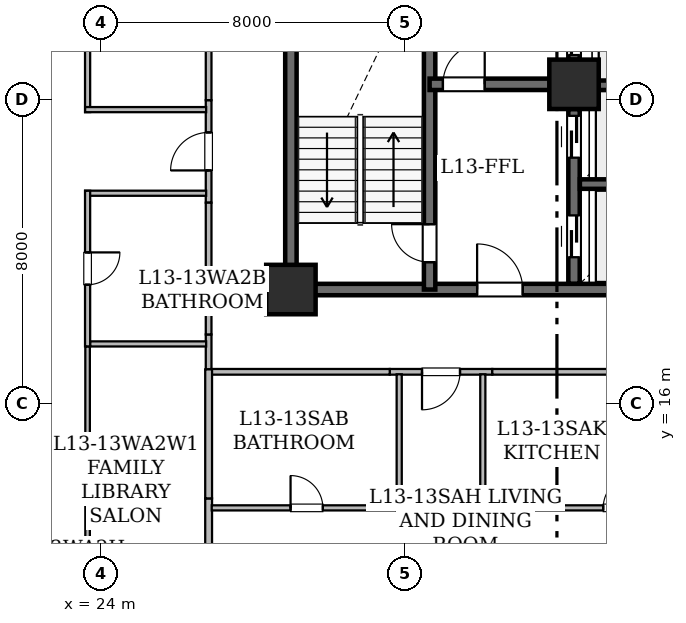
"""IFC4 building model, lengths in metres.
Left out: names, types, materials, properties, quantities, classifications, styles, units other than length and angle.
Written with IfcOpenShell. Run it as: python <this file> out.ifc"""

import sys

from ifc_helpers import new_model, si_unit, direction, frame, frame_2d, origin, origin_2d, place, context, subcontext, project, spatial, rectangle, hollow_rectangle, extrude, element, fill, save


model = new_model("IFC4")
c1 = context("Model", 3, precision=1e-05, world=origin(), true_north=direction((0.0, 1.0)))
c2 = subcontext(c1, "Body", "Model", "MODEL_VIEW")
j1 = project(units=[si_unit("LENGTHUNIT", "METRE"), si_unit("PLANEANGLEUNIT", "RADIAN")], contexts=[c1])
p1 = place(None, origin())
s1 = spatial("IfcSite", under=j1, at=p1, CompositionType="ELEMENT")
p2 = place(p1, origin())
s2 = spatial("IfcBuilding", under=s1, at=p2, CompositionType="ELEMENT")
p3 = place(p2, frame((0.0, 0.0, 55.2)))
s3 = spatial("IfcBuildingStorey", under=s2, at=p3, CompositionType="ELEMENT", Elevation=55.2)
for number, where, z_axis, x_axis in (
    (1, (29.0, 19.0, 0.0), (0.0, 0.0, 1.0), (1.0, 0.0, 0.0)),
    (2, (36.45, 24.4, 0.0), (0.0, 0.0, 1.0), (1.0, 0.0, 0.0)),
):
    element("IfcColumn", number, at=place(p3, frame(where, z_axis=z_axis, x_axis=x_axis)), inside=s3, PredefinedType="COLUMN", context=c2, shape_type="SweptSolid", body=[
        extrude(hollow_rectangle(XDim=1.3, YDim=1.3, WallThickness=0.065, at=origin_2d()), origin(), (0.0, 0.0, 1.0), 3.65),
    ])
p4 = place(p3, frame((29.0, 19.0, 0.0), z_axis=(0.0, 0.0, 1.0), x_axis=(0.0, 1.0, 0.0)))
e3 = element("IfcWall", 3, at=p4, inside=s3, PredefinedType="SHEAR", context=c2, shape_type="SweptSolid", body=[
    extrude(rectangle(XDim=9.0, YDim=0.3, at=frame_2d((4.5, 0.0))), origin(), (0.0, 0.0, 1.0), 3.43),
])
p5 = place(p3, frame((29.0, 19.0, 0.0), z_axis=(0.0, 0.0, 1.0), x_axis=(1.0, 0.0, 0.0)))
e4 = element("IfcWall", 4, at=p5, inside=s3, PredefinedType="SHEAR", context=c2, shape_type="SweptSolid", body=[
    extrude(rectangle(XDim=10.4, YDim=0.3, at=frame_2d((5.2, 0.0))), origin(), (0.0, 0.0, 1.0), 3.43),
])
p6 = place(p5, frame((4.9, 0.0, 0.0)))
e5 = element("IfcOpeningElement", 5, at=p6, cuts=e4, PredefinedType="OPENING", context=c2, shape_type="SweptSolid", body=[
    extrude(rectangle(XDim=1.2, YDim=2.15, at=frame_2d((0.6, 1.075))), frame((0.0, 0.16, 0.0), z_axis=(0.0, -1.0, 0.0), x_axis=(1.0, 0.0, 0.0)), (0.0, 0.0, 1.0), 0.32),
])
p7 = place(p3, frame((32.65, 19.0, 0.0), z_axis=(0.0, 0.0, 1.0), x_axis=(0.0, 1.0, 0.0)))
e6 = element("IfcWall", 6, at=p7, inside=s3, PredefinedType="SHEAR", context=c2, shape_type="SweptSolid", body=[
    extrude(rectangle(XDim=9.0, YDim=0.3, at=frame_2d((4.5, 0.0))), origin(), (0.0, 0.0, 1.0), 3.43),
])
p8 = place(p7, frame((0.72, 0.0, 0.0)))
e7 = element("IfcOpeningElement", 7, at=p8, cuts=e6, PredefinedType="OPENING", context=c2, shape_type="SweptSolid", body=[
    extrude(rectangle(XDim=1.0, YDim=2.15, at=frame_2d((0.5, 1.075))), frame((0.0, 0.16, 0.0), z_axis=(0.0, -1.0, 0.0), x_axis=(1.0, 0.0, 0.0)), (0.0, 0.0, 1.0), 0.32),
])
p9 = place(p3, frame((32.65, 24.4, 0.0), z_axis=(0.0, 0.0, 1.0), x_axis=(1.0, 0.0, 0.0)))
e8 = element("IfcWall", 8, at=p9, inside=s3, PredefinedType="SHEAR", context=c2, shape_type="SweptSolid", body=[
    extrude(rectangle(XDim=3.8, YDim=0.3, at=frame_2d((1.9, 0.0))), origin(), (0.0, 0.0, 1.0), 3.43),
])
p10 = place(p9, frame((0.35, 0.0, 0.0)))
e9 = element("IfcOpeningElement", 9, at=p10, cuts=e8, PredefinedType="OPENING", context=c2, shape_type="SweptSolid", body=[
    extrude(rectangle(XDim=1.1, YDim=2.15, at=frame_2d((0.55, 1.075))), frame((0.0, 0.16, 0.0), z_axis=(0.0, -1.0, 0.0), x_axis=(1.0, 0.0, 0.0)), (0.0, 0.0, 1.0), 0.32),
])
p11 = place(p3, frame((36.45, 19.154, 0.0), z_axis=(0.0, 0.0, 1.0), x_axis=(0.0, 1.0, 0.0)))
e10 = element("IfcWall", 10, at=p11, inside=s3, PredefinedType="SHEAR", context=c2, shape_type="SweptSolid", body=[
    extrude(rectangle(XDim=4.596, YDim=0.3, at=frame_2d((2.298, 0.0))), origin(), (0.0, 0.0, 1.0), 3.43),
])
p12 = place(p11, frame((0.696, 0.0, 0.0)))
e11 = element("IfcOpeningElement", 11, at=p12, cuts=e10, PredefinedType="OPENING", context=c2, shape_type="SweptSolid", body=[
    extrude(rectangle(XDim=1.1, YDim=2.15, at=frame_2d((0.55, 1.075))), frame((0.0, 0.16, 0.0), z_axis=(0.0, -1.0, 0.0), x_axis=(1.0, 0.0, 0.0)), (0.0, 0.0, 1.0), 0.32),
])
p13 = place(p11, frame((3.316, 0.0, 0.0)))
e12 = element("IfcOpeningElement", 12, at=p13, cuts=e10, PredefinedType="OPENING", context=c2, shape_type="SweptSolid", body=[
    extrude(rectangle(XDim=1.1, YDim=2.15, at=frame_2d((0.55, 1.075))), frame((0.0, 0.16, 0.0), z_axis=(0.0, -1.0, 0.0), x_axis=(1.0, 0.0, 0.0)), (0.0, 0.0, 1.0), 0.32),
])
p14 = place(p3, frame((36.45, 25.05, 0.0), z_axis=(0.0, 0.0, 1.0), x_axis=(0.0, 1.0, 0.0)))
e13 = element("IfcWall", 13, at=p14, inside=s3, PredefinedType="SHEAR", context=c2, shape_type="SweptSolid", body=[
    extrude(rectangle(XDim=5.05, YDim=0.3, at=frame_2d((2.525, 0.0))), origin(), (0.0, 0.0, 1.0), 3.43),
])
p15 = place(p14, frame((0.12, 0.0, 0.0)))
e14 = element("IfcOpeningElement", 14, at=p15, cuts=e13, PredefinedType="OPENING", context=c2, shape_type="SweptSolid", body=[
    extrude(rectangle(XDim=1.05, YDim=2.15, at=frame_2d((0.525, 1.075))), frame((0.0, 0.16, 0.0), z_axis=(0.0, -1.0, 0.0), x_axis=(1.0, 0.0, 0.0)), (0.0, 0.0, 1.0), 0.32),
])
p16 = place(p14, frame((2.045, 0.0, 0.0)))
e15 = element("IfcOpeningElement", 15, at=p16, cuts=e13, PredefinedType="OPENING", context=c2, shape_type="SweptSolid", body=[
    extrude(rectangle(XDim=1.05, YDim=2.15, at=frame_2d((0.525, 1.075))), frame((0.0, 0.16, 0.0), z_axis=(0.0, -1.0, 0.0), x_axis=(1.0, 0.0, 0.0)), (0.0, 0.0, 1.0), 0.32),
])
p17 = place(p14, frame((3.88, 0.0, 0.0)))
e16 = element("IfcOpeningElement", 16, at=p17, cuts=e13, PredefinedType="OPENING", context=c2, shape_type="SweptSolid", body=[
    extrude(rectangle(XDim=1.05, YDim=2.15, at=frame_2d((0.525, 1.075))), frame((0.0, 0.16, 0.0), z_axis=(0.0, -1.0, 0.0), x_axis=(1.0, 0.0, 0.0)), (0.0, 0.0, 1.0), 0.32),
])
for number, where, z_axis, x_axis in (
    (17, (36.604, 21.775, 0.0), (0.0, 0.0, 1.0), (1.0, 0.0, 0.0)),
    (18, (36.604, 24.375, 0.0), (0.0, 0.0, 1.0), (1.0, 0.0, 0.0)),
):
    element("IfcWall", number, at=place(p3, frame(where, z_axis=z_axis, x_axis=x_axis)), inside=s3, PredefinedType="SHEAR", context=c2, shape_type="SweptSolid", body=[
        extrude(rectangle(XDim=2.642, YDim=0.25, at=frame_2d((1.321, 0.0))), origin(), (0.0, 0.0, 1.0), 3.43),
    ])
p18 = place(p3, frame((26.835, 16.9, 0.0), z_axis=(0.0, 0.0, 1.0), x_axis=(0.0, 1.0, 0.0)))
e19 = element("IfcWall", 19, at=p18, inside=s3, PredefinedType="STANDARD", context=c2, shape_type="SweptSolid", body=[
    extrude(rectangle(XDim=0.918, YDim=0.15, at=frame_2d((0.459, 0.0))), origin(), (0.0, 0.0, 1.0), 3.43),
])
p19 = place(p3, frame((26.835, 21.285, 0.0), z_axis=(0.0, 0.0, 1.0), x_axis=(0.0, 1.0, 0.0)))
e20 = element("IfcWall", 20, at=p19, inside=s3, PredefinedType="STANDARD", context=c2, shape_type="SweptSolid", body=[
    extrude(rectangle(XDim=2.698, YDim=0.15, at=frame_2d((1.349, 0.0))), origin(), (0.0, 0.0, 1.0), 3.43),
])
p20 = place(p19, frame((0.849, 0.0, 0.0)))
e21 = element("IfcOpeningElement", 21, at=p20, cuts=e20, PredefinedType="OPENING", context=c2, shape_type="SweptSolid", body=[
    extrude(rectangle(XDim=1.0, YDim=2.15, at=frame_2d((0.5, 1.075))), frame((0.0, 0.085, 0.0), z_axis=(0.0, -1.0, 0.0), x_axis=(1.0, 0.0, 0.0)), (0.0, 0.0, 1.0), 0.17),
])
p21 = place(p3, frame((26.835, 17.818, 0.0), z_axis=(0.0, 0.0, 1.0), x_axis=(0.0, 1.0, 0.0)))
e22 = element("IfcWall", 22, at=p21, inside=s3, PredefinedType="STANDARD", context=c2, shape_type="SweptSolid", body=[
    extrude(rectangle(XDim=3.467, YDim=0.15, at=frame_2d((1.733, 0.0))), origin(), (0.0, 0.0, 1.0), 2.647),
])
p22 = place(p3, frame((26.835, 23.983, 0.0), z_axis=(0.0, 0.0, 1.0), x_axis=(0.0, 1.0, 0.0)))
e23 = element("IfcWall", 23, at=p22, inside=s3, PredefinedType="STANDARD", context=c2, shape_type="SweptSolid", body=[
    extrude(rectangle(XDim=7.017, YDim=0.15, at=frame_2d((3.509, 0.0))), origin(), (0.0, 0.0, 1.0), 2.957),
])
p23 = place(p3, frame((34.299, 16.835, 0.0), z_axis=(0.0, 0.0, 1.0), x_axis=(-1.0, 0.0, 0.0)))
e24 = element("IfcWall", 24, at=p23, inside=s3, PredefinedType="STANDARD", context=c2, shape_type="SweptSolid", body=[
    extrude(rectangle(XDim=2.698, YDim=0.15, at=frame_2d((1.349, 0.0))), origin(), (0.0, 0.0, 1.0), 3.43),
])
p24 = place(p23, frame((0.849, 0.0, 0.0)))
e25 = element("IfcOpeningElement", 25, at=p24, cuts=e24, PredefinedType="OPENING", context=c2, shape_type="SweptSolid", body=[
    extrude(rectangle(XDim=1.0, YDim=2.15, at=frame_2d((0.5, 1.075))), frame((0.0, 0.085, 0.0), z_axis=(0.0, -1.0, 0.0), x_axis=(1.0, 0.0, 0.0)), (0.0, 0.0, 1.0), 0.17),
])
p25 = place(p3, frame((31.601, 16.835, 0.0), z_axis=(0.0, 0.0, 1.0), x_axis=(-1.0, 0.0, 0.0)))
e26 = element("IfcWall", 26, at=p25, inside=s3, PredefinedType="STANDARD", context=c2, shape_type="SweptSolid", body=[
    extrude(rectangle(XDim=4.701, YDim=0.15, at=frame_2d((2.351, 0.0))), origin(), (0.0, 0.0, 1.0), 2.647),
])
p26 = place(p3, frame((41.3, 16.835, 0.0), z_axis=(0.0, 0.0, 1.0), x_axis=(-1.0, 0.0, 0.0)))
e27 = element("IfcWall", 27, at=p26, inside=s3, PredefinedType="STANDARD", context=c2, shape_type="SweptSolid", body=[
    extrude(rectangle(XDim=7.001, YDim=0.15, at=frame_2d((3.5, 0.0))), origin(), (0.0, 0.0, 1.0), 3.43),
])
p27 = place(p3, frame((23.65, 3.212, 0.0), z_axis=(0.0, 0.0, 1.0), x_axis=(0.0, 1.0, 0.0)))
e28 = element("IfcWall", 28, at=p27, inside=s3, PredefinedType="PARTITIONING", context=c2, shape_type="SweptSolid", body=[
    extrude(rectangle(XDim=14.292, YDim=0.12, at=frame_2d((7.146, 0.0))), origin(), (0.0, 0.0, 1.0), 2.803),
])
p28 = place(p27, frame((6.696, 0.0, 0.0)))
e29 = element("IfcOpeningElement", 29, at=p28, cuts=e28, PredefinedType="OPENING", context=c2, shape_type="SweptSolid", body=[
    extrude(rectangle(XDim=0.9, YDim=2.1, at=frame_2d((0.45, 1.05))), frame((0.0, 0.07, 0.0), z_axis=(0.0, -1.0, 0.0), x_axis=(1.0, 0.0, 0.0)), (0.0, 0.0, 1.0), 0.14),
])
p29 = place(p3, frame((23.715, 17.569, 0.0), z_axis=(0.0, 0.0, 1.0), x_axis=(1.0, 0.0, 0.0)))
e30 = element("IfcWall", 30, at=p29, inside=s3, PredefinedType="PARTITIONING", context=c2, shape_type="SweptSolid", body=[
    extrude(rectangle(XDim=3.055, YDim=0.135, at=frame_2d((1.527, 0.0))), origin(), (0.0, 0.0, 1.0), 3.43),
])
p30 = place(p3, frame((26.835, 13.504, 0.0), z_axis=(0.0, 0.0, 1.0), x_axis=(0.0, -1.0, 0.0)))
e31 = element("IfcWall", 31, at=p30, inside=s3, PredefinedType="STANDARD", context=c2, shape_type="SweptSolid", body=[
    extrude(rectangle(XDim=2.078, YDim=0.18, at=frame_2d((1.039, 0.0))), origin(), (0.0, 0.0, 1.0), 3.43),
])
p31 = place(p3, frame((26.835, 16.9, 0.0), z_axis=(0.0, 0.0, 1.0), x_axis=(0.0, -1.0, 0.0)))
e32 = element("IfcWall", 32, at=p31, inside=s3, PredefinedType="STANDARD", context=c2, shape_type="SweptSolid", body=[
    extrude(rectangle(XDim=3.396, YDim=0.18, at=frame_2d((1.698, 0.0))), origin(), (0.0, 0.0, 1.0), 3.43),
])
p32 = place(p3, frame((26.77, 21.534, 0.0), z_axis=(0.0, 0.0, 1.0), x_axis=(-1.0, 0.0, 0.0)))
e33 = element("IfcWall", 33, at=p32, inside=s3, PredefinedType="PARTITIONING", context=c2, shape_type="SweptSolid", body=[
    extrude(rectangle(XDim=3.185, YDim=0.135, at=frame_2d((1.593, 0.0))), origin(), (0.0, 0.0, 1.0), 3.43),
])
p33 = place(p3, frame((23.65, 21.599, 0.0), z_axis=(0.0, 0.0, 1.0), x_axis=(0.0, -1.0, 0.0)))
e34 = element("IfcWall", 34, at=p33, inside=s3, PredefinedType="PARTITIONING", context=c2, shape_type="SweptSolid", body=[
    extrude(rectangle(XDim=4.095, YDim=0.135, at=frame_2d((2.048, 0.0))), origin(), (0.0, 0.0, 1.0), 2.647),
])
p34 = place(p33, frame((1.622, 0.0, 0.0)))
e35 = element("IfcOpeningElement", 35, at=p34, cuts=e34, PredefinedType="OPENING", context=c2, shape_type="SweptSolid", body=[
    extrude(rectangle(XDim=0.85, YDim=2.1, at=frame_2d((0.425, 1.05))), frame((0.0, 0.077, 0.0), z_axis=(0.0, -1.0, 0.0), x_axis=(1.0, 0.0, 0.0)), (0.0, 0.0, 1.0), 0.155),
])
p35 = place(p3, frame((23.65, 30.868, 0.0), z_axis=(0.0, 0.0, 1.0), x_axis=(0.0, -1.0, 0.0)))
e36 = element("IfcWall", 36, at=p35, inside=s3, PredefinedType="PARTITIONING", context=c2, shape_type="SweptSolid", body=[
    extrude(rectangle(XDim=7.199, YDim=0.135, at=frame_2d((3.6, 0.0))), origin(), (0.0, 0.0, 1.0), 2.957),
])
p36 = place(p35, frame((3.175, 0.0, 0.0)))
e37 = element("IfcOpeningElement", 37, at=p36, cuts=e36, PredefinedType="OPENING", context=c2, shape_type="SweptSolid", body=[
    extrude(rectangle(XDim=0.85, YDim=2.1, at=frame_2d((0.425, 1.05))), frame((0.0, 0.077, 0.0), z_axis=(0.0, -1.0, 0.0), x_axis=(1.0, 0.0, 0.0)), (0.0, 0.0, 1.0), 0.155),
])
p37 = place(p3, frame((23.585, 23.734, 0.0), z_axis=(0.0, 0.0, 1.0), x_axis=(1.0, 0.0, 0.0)))
e38 = element("IfcWall", 38, at=p37, inside=s3, PredefinedType="PARTITIONING", context=c2, shape_type="SweptSolid", body=[
    extrude(rectangle(XDim=3.185, YDim=0.135, at=frame_2d((1.593, 0.0))), origin(), (0.0, 0.0, 1.0), 3.43),
])
p38 = place(p3, frame((26.917, 13.255, 0.0), z_axis=(0.0, 0.0, 1.0), x_axis=(1.0, 0.0, 0.0)))
e39 = element("IfcWall", 39, at=p38, inside=s3, PredefinedType="PARTITIONING", context=c2, shape_type="SweptSolid", body=[
    extrude(rectangle(XDim=4.998, YDim=0.135, at=frame_2d((2.499, 0.0))), origin(), (0.0, 0.0, 1.0), 2.647),
])
p39 = place(p38, frame((2.074, 0.0, 0.0)))
e40 = element("IfcOpeningElement", 40, at=p39, cuts=e39, PredefinedType="OPENING", context=c2, shape_type="SweptSolid", body=[
    extrude(rectangle(XDim=0.85, YDim=2.1, at=frame_2d((0.425, 1.05))), frame((0.0, 0.077, 0.0), z_axis=(0.0, -1.0, 0.0), x_axis=(1.0, 0.0, 0.0)), (0.0, 0.0, 1.0), 0.155),
])
for number, where, z_axis, x_axis in (
    (41, (31.85, 13.19, 0.0), (0.0, 0.0, 1.0), (0.0, 1.0, 0.0)),
    (42, (34.05, 16.77, 0.0), (0.0, 0.0, 1.0), (0.0, -1.0, 0.0)),
):
    element("IfcWall", number, at=place(p3, frame(where, z_axis=z_axis, x_axis=x_axis)), inside=s3, PredefinedType="PARTITIONING", context=c2, shape_type="SweptSolid", body=[
        extrude(rectangle(XDim=3.58, YDim=0.135, at=frame_2d((1.79, 0.0))), origin(), (0.0, 0.0, 1.0), 3.43),
    ])
p40 = place(p3, frame((33.985, 13.255, 0.0), z_axis=(0.0, 0.0, 1.0), x_axis=(1.0, 0.0, 0.0)))
e43 = element("IfcWall", 43, at=p40, inside=s3, PredefinedType="PARTITIONING", context=c2, shape_type="SweptSolid", body=[
    extrude(rectangle(XDim=7.315, YDim=0.135, at=frame_2d((3.657, 0.0))), origin(), (0.0, 0.0, 1.0), 3.43),
])
p41 = place(p40, frame((3.233, 0.0, 0.0)))
e44 = element("IfcOpeningElement", 44, at=p41, cuts=e43, PredefinedType="OPENING", context=c2, shape_type="SweptSolid", body=[
    extrude(rectangle(XDim=0.85, YDim=2.1, at=frame_2d((0.425, 1.05))), frame((0.0, 0.077, 0.0), z_axis=(0.0, -1.0, 0.0), x_axis=(1.0, 0.0, 0.0)), (0.0, 0.0, 1.0), 0.155),
])
p42 = place(p8, origin())
e45 = element("IfcDoor", 45, at=p42, inside=s3, OperationType="SINGLE_SWING_RIGHT", PredefinedType="DOOR", context=c2, shape_type="SweptSolid", body=[
    extrude(rectangle(XDim=1.0, YDim=2.15, at=frame_2d((0.5, 1.075))), frame((0.0, 0.025, 0.0), z_axis=(0.0, -1.0, 0.0), x_axis=(1.0, 0.0, 0.0)), (0.0, 0.0, 1.0), 0.05),
])
fill(e7, e45)
p43 = place(p10, origin())
e46 = element("IfcDoor", 46, at=p43, inside=s3, OperationType="SINGLE_SWING_RIGHT", PredefinedType="DOOR", context=c2, shape_type="SweptSolid", body=[
    extrude(rectangle(XDim=1.1, YDim=2.15, at=frame_2d((0.55, 1.075))), frame((0.0, 0.025, 0.0), z_axis=(0.0, -1.0, 0.0), x_axis=(1.0, 0.0, 0.0)), (0.0, 0.0, 1.0), 0.05),
])
fill(e9, e46)
p44 = place(p6, origin())
e47 = element("IfcDoor", 47, at=p44, inside=s3, OperationType="SINGLE_SWING_LEFT", PredefinedType="DOOR", context=c2, shape_type="SweptSolid", body=[
    extrude(rectangle(XDim=1.2, YDim=2.15, at=frame_2d((0.6, 1.075))), frame((0.0, 0.025, 0.0), z_axis=(0.0, -1.0, 0.0), x_axis=(1.0, 0.0, 0.0)), (0.0, 0.0, 1.0), 0.05),
])
fill(e5, e47)
p45 = place(p12, origin())
e48 = element("IfcDoor", 48, at=p45, inside=s3, OperationType="SLIDING_TO_LEFT", PredefinedType="DOOR", context=c2, shape_type="SweptSolid", body=[
    extrude(rectangle(XDim=1.1, YDim=2.15, at=frame_2d((0.55, 1.075))), frame((0.0, 0.025, 0.0), z_axis=(0.0, -1.0, 0.0), x_axis=(1.0, 0.0, 0.0)), (0.0, 0.0, 1.0), 0.05),
])
fill(e11, e48)
p46 = place(p13, origin())
e49 = element("IfcDoor", 49, at=p46, inside=s3, OperationType="SLIDING_TO_LEFT", PredefinedType="DOOR", context=c2, shape_type="SweptSolid", body=[
    extrude(rectangle(XDim=1.1, YDim=2.15, at=frame_2d((0.55, 1.075))), frame((0.0, 0.025, 0.0), z_axis=(0.0, -1.0, 0.0), x_axis=(1.0, 0.0, 0.0)), (0.0, 0.0, 1.0), 0.05),
])
fill(e12, e49)
p47 = place(p15, origin())
e50 = element("IfcDoor", 50, at=p47, inside=s3, OperationType="SLIDING_TO_LEFT", PredefinedType="DOOR", context=c2, shape_type="SweptSolid", body=[
    extrude(rectangle(XDim=1.05, YDim=2.15, at=frame_2d((0.525, 1.075))), frame((0.0, 0.025, 0.0), z_axis=(0.0, -1.0, 0.0), x_axis=(1.0, 0.0, 0.0)), (0.0, 0.0, 1.0), 0.05),
])
fill(e14, e50)
p48 = place(p20, origin())
e51 = element("IfcDoor", 51, at=p48, inside=s3, OperationType="SINGLE_SWING_LEFT", PredefinedType="DOOR", context=c2, shape_type="SweptSolid", body=[
    extrude(rectangle(XDim=1.0, YDim=2.15, at=frame_2d((0.5, 1.075))), frame((0.0, 0.025, 0.0), z_axis=(0.0, -1.0, 0.0), x_axis=(1.0, 0.0, 0.0)), (0.0, 0.0, 1.0), 0.05),
])
fill(e21, e51)
p49 = place(p24, origin())
e52 = element("IfcDoor", 52, at=p49, inside=s3, OperationType="SINGLE_SWING_RIGHT", PredefinedType="DOOR", context=c2, shape_type="SweptSolid", body=[
    extrude(rectangle(XDim=1.0, YDim=2.15, at=frame_2d((0.5, 1.075))), frame((0.0, 0.025, 0.0), z_axis=(0.0, -1.0, 0.0), x_axis=(1.0, 0.0, 0.0)), (0.0, 0.0, 1.0), 0.05),
])
fill(e25, e52)
p50 = place(p34, origin())
e53 = element("IfcDoor", 53, at=p50, inside=s3, OperationType="SINGLE_SWING_LEFT", PredefinedType="DOOR", context=c2, shape_type="SweptSolid", body=[
    extrude(rectangle(XDim=0.85, YDim=2.1, at=frame_2d((0.425, 1.05))), frame((0.0, 0.025, 0.0), z_axis=(0.0, -1.0, 0.0), x_axis=(1.0, 0.0, 0.0)), (0.0, 0.0, 1.0), 0.05),
])
fill(e35, e53)
p51 = place(p39, origin())
e54 = element("IfcDoor", 54, at=p51, inside=s3, OperationType="SINGLE_SWING_LEFT", PredefinedType="DOOR", context=c2, shape_type="SweptSolid", body=[
    extrude(rectangle(XDim=0.85, YDim=2.1, at=frame_2d((0.425, 1.05))), frame((0.0, 0.025, 0.0), z_axis=(0.0, -1.0, 0.0), x_axis=(1.0, 0.0, 0.0)), (0.0, 0.0, 1.0), 0.05),
])
fill(e40, e54)
p52 = place(p41, origin())
e55 = element("IfcDoor", 55, at=p52, inside=s3, OperationType="SINGLE_SWING_RIGHT", PredefinedType="DOOR", context=c2, shape_type="SweptSolid", body=[
    extrude(rectangle(XDim=0.85, YDim=2.1, at=frame_2d((0.425, 1.05))), frame((0.0, 0.025, 0.0), z_axis=(0.0, -1.0, 0.0), x_axis=(1.0, 0.0, 0.0)), (0.0, 0.0, 1.0), 0.05),
])
fill(e44, e55)
save(model, sys.argv[1])
